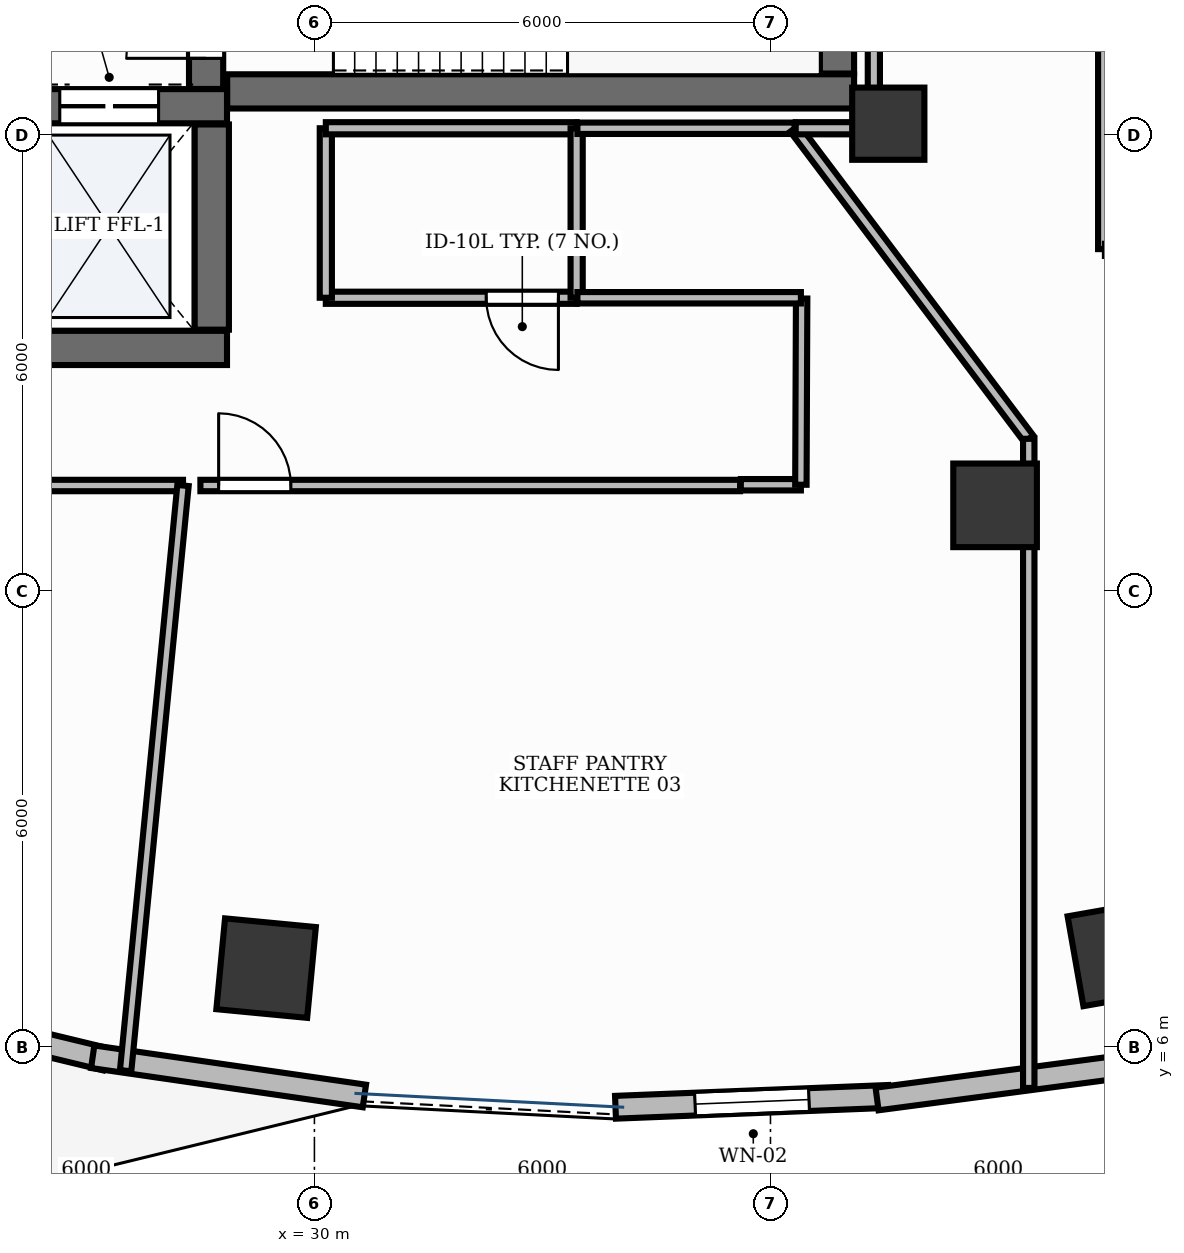
"""IFC4 building model, lengths in metres.
Left out: names, types, materials, properties, quantities, classifications, styles, units other than length and angle.
Written with IfcOpenShell. Run it as: python <this file> out.ifc"""

import sys

from ifc_helpers import new_model, si_unit, direction, frame, frame_2d, origin, origin_2d, place, context, subcontext, project, spatial, rectangle, extrude, element, fill, save


model = new_model("IFC4")
c1 = context("Model", 3, precision=1e-05, world=origin(), true_north=direction((0.0, 1.0)))
c2 = subcontext(c1, "Body", "Model", "MODEL_VIEW")
j1 = project(units=[si_unit("LENGTHUNIT", "METRE"), si_unit("PLANEANGLEUNIT", "RADIAN")], contexts=[c1])
p1 = place(None, origin())
s1 = spatial("IfcSite", under=j1, at=p1, CompositionType="ELEMENT")
p2 = place(p1, origin())
s2 = spatial("IfcBuilding", under=s1, at=p2, CompositionType="ELEMENT")
p3 = place(p2, frame((0.0, 0.0, 94.2)))
s3 = spatial("IfcBuildingStorey", under=s2, at=p3, CompositionType="ELEMENT", Elevation=94.2)
p4 = place(p3, frame((28.852, 18.575, 0.0), z_axis=(0.0, 0.0, 1.0), x_axis=(1.0, 0.0, 0.0)))
e1 = element("IfcWall", 1, at=p4, inside=s3, PredefinedType="SHEAR", context=c2, shape_type="SweptSolid", body=[
    extrude(rectangle(XDim=8.248, YDim=0.45, at=frame_2d((4.124, 0.0))), origin(), (0.0, 0.0, 1.0), 3.9),
])
p5 = place(p3, frame((36.875, 18.81, 0.0), z_axis=(0.0, 0.0, 1.0), x_axis=(0.0, 1.0, 0.0)))
e2 = element("IfcWall", 2, at=p5, inside=s3, PredefinedType="SHEAR", context=c2, shape_type="SweptSolid", body=[
    extrude(rectangle(XDim=3.08, YDim=0.45, at=frame_2d((1.54, 0.0))), origin(), (0.0, 0.0, 1.0), 3.9),
])
p6 = place(p3, frame((28.575, 18.607, 0.0), z_axis=(0.0, 0.0, 1.0), x_axis=(0.0, 1.0, 0.0)))
e3 = element("IfcWall", 3, at=p6, inside=s3, PredefinedType="SHEAR", context=c2, shape_type="SweptSolid", body=[
    extrude(rectangle(XDim=3.283, YDim=0.45, at=frame_2d((1.642, 0.0))), origin(), (0.0, 0.0, 1.0), 3.9),
])
p7 = place(p6, frame((0.403, 0.0, 0.0)))
e4 = element("IfcOpeningElement", 4, at=p7, cuts=e3, PredefinedType="OPENING", context=c2, shape_type="SweptSolid", body=[
    extrude(rectangle(XDim=1.05, YDim=2.15, at=frame_2d((0.525, 1.075))), frame((0.0, 0.24, 0.0), z_axis=(0.0, -1.0, 0.0), x_axis=(1.0, 0.0, 0.0)), (0.0, 0.0, 1.0), 0.48),
])
p8 = place(p3, frame((25.75, 15.2, 0.0), z_axis=(0.0, 0.0, 1.0), x_axis=(1.0, 0.0, 0.0)))
e5 = element("IfcWall", 5, at=p8, inside=s3, PredefinedType="SHEAR", context=c2, shape_type="SweptSolid", body=[
    extrude(rectangle(XDim=3.1, YDim=0.45, at=frame_2d((1.55, 0.0))), origin(), (0.0, 0.0, 1.0), 3.9),
])
p9 = place(p3, frame((25.75, 18.38, 0.0), z_axis=(0.0, 0.0, 1.0), x_axis=(1.0, 0.0, 0.0)))
e6 = element("IfcWall", 6, at=p9, inside=s3, PredefinedType="SHEAR", context=c2, shape_type="SweptSolid", body=[
    extrude(rectangle(XDim=3.1, YDim=0.45, at=frame_2d((1.55, 0.0))), origin(), (0.0, 0.0, 1.0), 3.9),
])
p10 = place(p9, frame((0.9, 0.0, 0.0)))
e7 = element("IfcOpeningElement", 7, at=p10, cuts=e6, PredefinedType="OPENING", context=c2, shape_type="SweptSolid", body=[
    extrude(rectangle(XDim=1.3, YDim=2.2, at=frame_2d((0.65, 1.1))), frame((0.0, 0.24, 0.0), z_axis=(0.0, -1.0, 0.0), x_axis=(1.0, 0.0, 0.0)), (0.0, 0.0, 1.0), 0.48),
])
p11 = place(p3, frame((28.65, 15.44, 0.0), z_axis=(0.0, 0.0, 1.0), x_axis=(0.0, 1.0, 0.0)))
e8 = element("IfcWall", 8, at=p11, inside=s3, PredefinedType="SHEAR", context=c2, shape_type="SweptSolid", body=[
    extrude(rectangle(XDim=2.7, YDim=0.45, at=frame_2d((1.35, 0.0))), origin(), (0.0, 0.0, 1.0), 3.9),
])
p12 = place(p3, frame((37.55, 18.15, -0.0), z_axis=(0.0, 0.0, 1.0), x_axis=(1.0, 0.0, 0.0)))
e9 = element("IfcColumn", 9, at=p12, inside=s3, PredefinedType="PILASTER", context=c2, shape_type="SweptSolid", body=[
    extrude(rectangle(XDim=0.95, YDim=0.95, at=origin_2d()), origin(), (0.0, 0.0, 1.0), 3.901),
])
for number, where, z_axis, x_axis in (
    (10, (29.364, 7.041, -0.0), (0.0, 0.0, 1.0), (-0.995, 0.095, 0.0)),
    (11, (40.604, 7.235, -0.0), (0.0, 0.0, 1.0), (0.985, 0.173, 0.0)),
):
    element("IfcColumn", number, at=place(p3, frame(where, z_axis=z_axis, x_axis=x_axis)), inside=s3, PredefinedType="COLUMN", context=c2, shape_type="SweptSolid", body=[
        extrude(rectangle(XDim=1.2, YDim=1.2, at=origin_2d()), origin(), (0.0, 0.0, 1.0), 3.901),
    ])
p13 = place(p3, frame((38.955, 13.129, -0.0), z_axis=(0.0, 0.0, 1.0), x_axis=(1.0, 0.0, 0.0)))
e12 = element("IfcColumn", 12, at=p13, inside=s3, PredefinedType="COLUMN", context=c2, shape_type="SweptSolid", body=[
    extrude(rectangle(XDim=1.1, YDim=1.1, at=origin_2d()), origin(), (0.0, 0.0, 1.0), 3.901),
])
p14 = place(p3, frame((33.961, 5.21, 0.0), z_axis=(0.0, 0.0, 1.0), x_axis=(0.999210691503, 0.039723972445, 0.0)))
e13 = element("IfcWall", 13, at=p14, inside=s3, PredefinedType="STANDARD", context=c2, shape_type="SweptSolid", body=[
    extrude(rectangle(XDim=3.595, YDim=0.3, at=frame_2d((1.798, 0.0))), origin(), (0.0, 0.0, 1.0), 3.9),
])
p15 = place(p14, frame((1.048, 0.0, 0.95)))
e14 = element("IfcOpeningElement", 14, at=p15, cuts=e13, PredefinedType="OPENING", context=c2, shape_type="SweptSolid", body=[
    extrude(rectangle(XDim=1.5, YDim=1.8, at=frame_2d((0.75, 0.9))), frame((0.0, 0.165, 0.0), z_axis=(0.0, -1.0, 0.0), x_axis=(1.0, 0.0, 0.0)), (0.0, 0.0, 1.0), 0.33),
])
p16 = place(p3, frame((23.784, 6.68, 0.0), z_axis=(0.0, 0.0, 1.0), x_axis=(0.972043452321, -0.234801036625, 0.0)))
e15 = element("IfcWall", 15, at=p16, inside=s3, PredefinedType="STANDARD", context=c2, shape_type="SweptSolid", body=[
    extrude(rectangle(XDim=3.569, YDim=0.3, at=frame_2d((1.784, 0.0))), origin(), (0.0, 0.0, 1.0), 3.9),
])
p17 = place(p3, frame((27.083, 5.875, 0.0), z_axis=(0.0, 0.0, 1.0), x_axis=(0.989734732902, -0.142916613754, 0.0)))
e16 = element("IfcWall", 16, at=p17, inside=s3, PredefinedType="STANDARD", context=c2, shape_type="SweptSolid", body=[
    extrude(rectangle(XDim=3.611, YDim=0.3, at=frame_2d((1.806, 0.0))), origin(), (0.0, 0.0, 1.0), 3.9),
])
p18 = place(p3, frame((37.402, 5.319, 0.0), z_axis=(0.0, 0.0, 1.0), x_axis=(0.991372969521, 0.131071107816, 0.0)))
e17 = element("IfcWall", 17, at=p18, inside=s3, PredefinedType="STANDARD", context=c2, shape_type="SweptSolid", body=[
    extrude(rectangle(XDim=3.615, YDim=0.3, at=frame_2d((1.808, 0.0))), origin(), (0.0, 0.0, 1.0), 3.9),
])
p19 = place(p3, frame((33.45, 15.86, 0.0), z_axis=(0.0, 0.0, 1.0), x_axis=(-1.0, 0.0, 0.0)))
e18 = element("IfcWall", 18, at=p19, inside=s3, PredefinedType="PARTITIONING", context=c2, shape_type="SweptSolid", body=[
    extrude(rectangle(XDim=3.3, YDim=0.16, at=frame_2d((1.65, 0.0))), origin(), (0.0, 0.0, 1.0), 2.91),
])
p20 = place(p19, frame((0.24, 0.0, 0.0)))
e19 = element("IfcOpeningElement", 19, at=p20, cuts=e18, PredefinedType="OPENING", context=c2, shape_type="SweptSolid", body=[
    extrude(rectangle(XDim=0.95, YDim=2.15, at=frame_2d((0.475, 1.075))), frame((0.0, 0.095, 0.0), z_axis=(0.0, -1.0, 0.0), x_axis=(1.0, 0.0, 0.0)), (0.0, 0.0, 1.0), 0.19),
])
p21 = place(p3, frame((21.8, 13.39, 0.0), z_axis=(0.0, 0.0, 1.0), x_axis=(1.0, 0.0, 0.0)))
e20 = element("IfcWall", 20, at=p21, inside=s3, PredefinedType="PARTITIONING", context=c2, shape_type="SweptSolid", body=[
    extrude(rectangle(XDim=6.471, YDim=0.15, at=frame_2d((3.236, 0.0))), origin(), (0.0, 0.0, 1.0), 2.91),
])
p22 = place(p21, frame((0.859, 0.0, 0.0)))
e21 = element("IfcOpeningElement", 21, at=p22, cuts=e20, PredefinedType="OPENING", context=c2, shape_type="SweptSolid", body=[
    extrude(rectangle(XDim=0.95, YDim=2.15, at=frame_2d((0.475, 1.075))), frame((0.0, 0.09, 0.0), z_axis=(0.0, -1.0, 0.0), x_axis=(1.0, 0.0, 0.0)), (0.0, 0.0, 1.0), 0.18),
])
p23 = place(p3, frame((28.5, 13.39, 0.0), z_axis=(0.0, 0.0, 1.0), x_axis=(1.0, 0.0, 0.0)))
e22 = element("IfcWall", 22, at=p23, inside=s3, PredefinedType="PARTITIONING", context=c2, shape_type="SweptSolid", body=[
    extrude(rectangle(XDim=7.1, YDim=0.15, at=frame_2d((3.55, 0.0))), origin(), (0.0, 0.0, 1.0), 2.91),
])
p24 = place(p23, frame((0.24, 0.0, 0.0)))
e23 = element("IfcOpeningElement", 23, at=p24, cuts=e22, PredefinedType="OPENING", context=c2, shape_type="SweptSolid", body=[
    extrude(rectangle(XDim=0.95, YDim=2.15, at=frame_2d((0.475, 1.075))), frame((0.0, 0.09, 0.0), z_axis=(0.0, -1.0, 0.0), x_axis=(1.0, 0.0, 0.0)), (0.0, 0.0, 1.0), 0.18),
])
p25 = place(p3, frame((30.15, 15.86, 0.0), z_axis=(0.0, 0.0, 1.0), x_axis=(0.0, 1.0, 0.0)))
e24 = element("IfcWall", 24, at=p25, inside=s3, PredefinedType="PARTITIONING", context=c2, shape_type="SweptSolid", body=[
    extrude(rectangle(XDim=2.23, YDim=0.16, at=frame_2d((1.115, 0.0))), origin(), (0.0, 0.0, 1.0), 2.91),
])
p26 = place(p3, frame((30.15, 18.09, 0.0), z_axis=(0.0, 0.0, 1.0), x_axis=(1.0, 0.0, 0.0)))
e25 = element("IfcWall", 25, at=p26, inside=s3, PredefinedType="PARTITIONING", context=c2, shape_type="SweptSolid", body=[
    extrude(rectangle(XDim=3.3, YDim=0.16, at=frame_2d((1.65, 0.0))), origin(), (0.0, 0.0, 1.0), 2.91),
])
p27 = place(p3, frame((33.45, 18.09, 0.0), z_axis=(0.0, 0.0, 1.0), x_axis=(0.0, -1.0, 0.0)))
e26 = element("IfcWall", 26, at=p27, inside=s3, PredefinedType="PARTITIONING", context=c2, shape_type="SweptSolid", body=[
    extrude(rectangle(XDim=2.23, YDim=0.16, at=frame_2d((1.115, 0.0))), origin(), (0.0, 0.0, 1.0), 2.91),
])
p28 = place(p3, frame((28.271, 13.39, 0.0), z_axis=(0.0, 0.0, 1.0), x_axis=(-0.097584908723, -0.995227202999, 0.0)))
e27 = element("IfcWall", 27, at=p28, inside=s3, PredefinedType="PARTITIONING", context=c2, shape_type="SweptSolid", body=[
    extrude(rectangle(XDim=7.736, YDim=0.15, at=frame_2d((3.868, 0.0))), origin(), (0.0, 0.0, 1.0), 2.91),
])
p29 = place(p3, frame((35.61, 13.4, 0.0), z_axis=(0.0, 0.0, 1.0), x_axis=(1.0, 0.0, 0.0)))
e28 = element("IfcWall", 28, at=p29, inside=s3, PredefinedType="PARTITIONING", context=c2, shape_type="SweptSolid", body=[
    extrude(rectangle(XDim=0.79, YDim=0.15, at=frame_2d((0.395, 0.0))), origin(), (0.0, 0.0, 1.0), 2.91),
])
p30 = place(p3, frame((36.4, 13.4, 0.0), z_axis=(0.0, 0.0, 1.0), x_axis=(0.004085258855, 0.999991655295, 0.0)))
e29 = element("IfcWall", 29, at=p30, inside=s3, PredefinedType="PARTITIONING", context=c2, shape_type="SweptSolid", body=[
    extrude(rectangle(XDim=2.45, YDim=0.15, at=frame_2d((1.225, 0.0))), origin(), (0.0, 0.0, 1.0), 2.91),
])
p31 = place(p3, frame((36.4, 15.86, 0.0), z_axis=(0.0, 0.0, 1.0), x_axis=(-1.0, 0.0, 0.0)))
e30 = element("IfcWall", 30, at=p31, inside=s3, PredefinedType="PARTITIONING", context=c2, shape_type="SweptSolid", body=[
    extrude(rectangle(XDim=2.94, YDim=0.15, at=frame_2d((1.47, 0.0))), origin(), (0.0, 0.0, 1.0), 2.91),
])
p32 = place(p3, frame((33.46, 18.09, 0.0), z_axis=(0.0, 0.0, 1.0), x_axis=(1.0, 0.0, 0.0)))
e31 = element("IfcWall", 31, at=p32, inside=s3, PredefinedType="PARTITIONING", context=c2, shape_type="SweptSolid", body=[
    extrude(rectangle(XDim=2.859, YDim=0.15, at=frame_2d((1.43, 0.0))), origin(), (0.0, 0.0, 1.0), 2.91),
])
p33 = place(p3, frame((36.319, 18.09, 0.0), z_axis=(0.0, 0.0, 1.0), x_axis=(0.601792892962, -0.798652185861, 0.0)))
e32 = element("IfcWall", 32, at=p33, inside=s3, PredefinedType="PARTITIONING", context=c2, shape_type="SweptSolid", body=[
    extrude(rectangle(XDim=5.116, YDim=0.15, at=frame_2d((2.558, 0.0))), origin(), (0.0, 0.0, 1.0), 2.91),
])
p34 = place(p3, frame((39.398, 14.004, 0.0), z_axis=(0.0, 0.0, 1.0), x_axis=(0.0, -1.0, 0.0)))
e33 = element("IfcWall", 33, at=p34, inside=s3, PredefinedType="PARTITIONING", context=c2, shape_type="SweptSolid", body=[
    extrude(rectangle(XDim=8.54, YDim=0.15, at=frame_2d((4.27, 0.0))), origin(), (0.0, 0.0, 1.0), 2.91),
])
p35 = place(p3, frame((40.39, 20.416, 0.0), z_axis=(0.0, 0.0, 1.0), x_axis=(0.0, -1.0, 0.0)))
e34 = element("IfcWall", 34, at=p35, inside=s3, PredefinedType="PARTITIONING", context=c2, shape_type="SweptSolid", body=[
    extrude(rectangle(XDim=3.916, YDim=0.16, at=frame_2d((1.958, 0.0))), origin(), (0.0, 0.0, 1.0), 2.91),
])
p36 = place(p3, frame((36.332, 18.09, 0.0), z_axis=(0.0, 0.0, 1.0), x_axis=(1.0, 0.0, 0.0)))
e35 = element("IfcWall", 35, at=p36, inside=s3, PredefinedType="PARTITIONING", context=c2, shape_type="SweptSolid", body=[
    extrude(rectangle(XDim=1.018, YDim=0.16, at=frame_2d((0.509, 0.0))), origin(), (0.0, 0.0, 1.0), 2.91),
])
p37 = place(p3, frame((37.36, 18.1, 0.0), z_axis=(0.0, 0.0, 1.0), x_axis=(0.0, 1.0, 0.0)))
e36 = element("IfcWall", 36, at=p37, inside=s3, PredefinedType="PARTITIONING", context=c2, shape_type="SweptSolid", body=[
    extrude(rectangle(XDim=4.166, YDim=0.16, at=frame_2d((2.083, 0.0))), origin(), (0.0, 0.0, 1.0), 2.91),
])
p38 = place(p15, origin())
e37 = element("IfcWindow", 37, at=p38, inside=s3, PartitioningType="DOUBLE_PANEL_VERTICAL", PredefinedType="WINDOW", context=c2, shape_type="SweptSolid", body=[
    extrude(rectangle(XDim=1.5, YDim=1.8, at=frame_2d((0.75, 0.9))), frame((0.0, 0.03, 0.0), z_axis=(0.0, -1.0, 0.0), x_axis=(1.0, 0.0, 0.0)), (0.0, 0.0, 1.0), 0.06),
])
fill(e14, e37)
p39 = place(p7, origin())
e38 = element("IfcDoor", 38, at=p39, inside=s3, OperationType="SINGLE_SWING_LEFT", PredefinedType="DOOR", context=c2, shape_type="SweptSolid", body=[
    extrude(rectangle(XDim=1.05, YDim=2.15, at=frame_2d((0.525, 1.075))), frame((0.0, 0.025, 0.0), z_axis=(0.0, -1.0, 0.0), x_axis=(1.0, 0.0, 0.0)), (0.0, 0.0, 1.0), 0.05),
])
fill(e4, e38)
p40 = place(p10, origin())
e39 = element("IfcDoor", 39, at=p40, inside=s3, OperationType="DOUBLE_DOOR_SLIDING", PredefinedType="DOOR", context=c2, shape_type="SweptSolid", body=[
    extrude(rectangle(XDim=1.3, YDim=2.2, at=frame_2d((0.65, 1.1))), frame((0.0, 0.025, 0.0), z_axis=(0.0, -1.0, 0.0), x_axis=(1.0, 0.0, 0.0)), (0.0, 0.0, 1.0), 0.05),
])
fill(e7, e39)
p41 = place(p20, origin())
e40 = element("IfcDoor", 40, at=p41, inside=s3, OperationType="SINGLE_SWING_LEFT", PredefinedType="DOOR", context=c2, shape_type="SweptSolid", body=[
    extrude(rectangle(XDim=0.95, YDim=2.15, at=frame_2d((0.475, 1.075))), frame((0.0, 0.025, 0.0), z_axis=(0.0, -1.0, 0.0), x_axis=(1.0, 0.0, 0.0)), (0.0, 0.0, 1.0), 0.05),
])
fill(e19, e40)
p42 = place(p24, origin())
e41 = element("IfcDoor", 41, at=p42, inside=s3, OperationType="SINGLE_SWING_LEFT", PredefinedType="DOOR", context=c2, shape_type="SweptSolid", body=[
    extrude(rectangle(XDim=0.95, YDim=2.15, at=frame_2d((0.475, 1.075))), frame((0.0, 0.025, 0.0), z_axis=(0.0, -1.0, 0.0), x_axis=(1.0, 0.0, 0.0)), (0.0, 0.0, 1.0), 0.05),
])
fill(e23, e41)
save(model, sys.argv[1])
